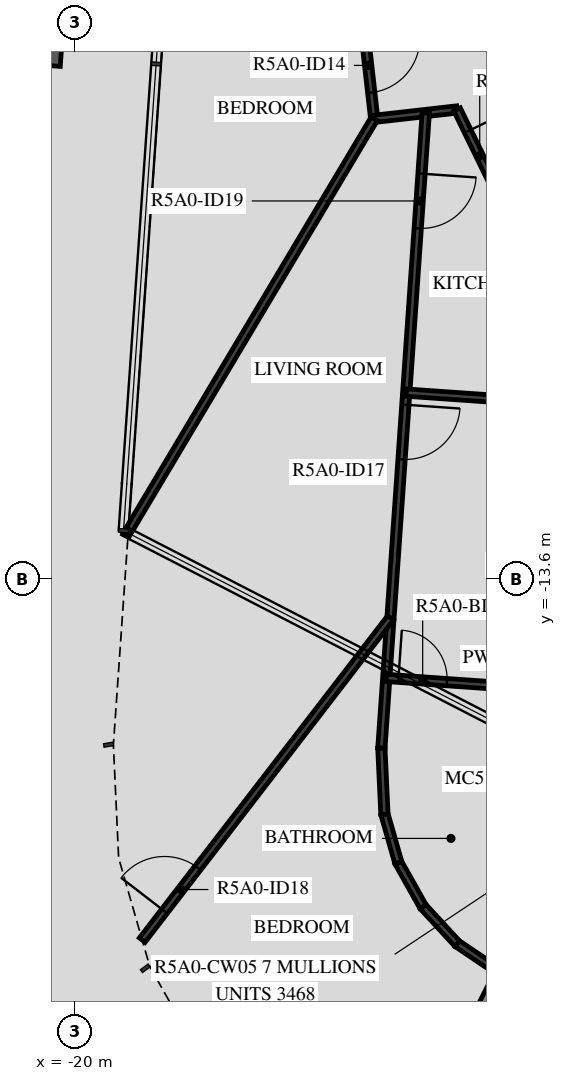
"""IFC4 building model, lengths in metres.
Left out: names, types, materials, properties, quantities, classifications, styles, units other than length and angle.
Written with IfcOpenShell. Run it as: python <this file> out.ifc"""

import sys

from ifc_helpers import new_model, si_unit, direction, frame, frame_2d, origin, origin_2d, place, context, subcontext, project, spatial, rectangle, i_section, extrude, element, fill, save


model = new_model("IFC4")
c1 = context("Model", 3, precision=1e-05, world=origin(), true_north=direction((0.0, 1.0)))
c2 = subcontext(c1, "Body", "Model", "MODEL_VIEW")
j1 = project(units=[si_unit("LENGTHUNIT", "METRE"), si_unit("PLANEANGLEUNIT", "RADIAN")], contexts=[c1])
p1 = place(None, origin())
s1 = spatial("IfcSite", under=j1, at=p1, CompositionType="ELEMENT")
p2 = place(p1, origin())
s2 = spatial("IfcBuilding", under=s1, at=p2, CompositionType="ELEMENT")
p3 = place(p2, frame((0.0, 0.0, 188.4)))
s3 = spatial("IfcBuildingStorey", under=s2, at=p3, CompositionType="ELEMENT", Elevation=188.4)
p4 = place(p3, frame((-20.679, -4.981, -0.45), z_axis=(0.0, 0.0, 1.0), x_axis=(0.069756005795, 0.997564082982, 0.0)))
e1 = element("IfcColumn", 1, at=p4, inside=s3, PredefinedType="COLUMN", context=c2, shape_type="SweptSolid", body=[
    extrude(i_section(OverallWidth=0.3, OverallDepth=0.9, WebThickness=0.019, FlangeThickness=0.035, FilletRadius=0.03, at=origin_2d()), origin(), (0.0, 0.0, 1.0), 3.57),
])
p5 = place(p3, frame((-23.066, -14.25, 0.03), z_axis=(0.0, 0.0, 1.0), x_axis=(0.182236609877, 0.983254706585, 0.0)))
e2 = element("IfcWall", 2, at=p5, inside=s3, PredefinedType="PARAPET", context=c2, shape_type="SweptSolid", body=[
    extrude(rectangle(XDim=36.429, YDim=0.2, at=frame_2d((18.214, 0.0))), origin(), (0.0, 0.0, 1.0), 1.5),
])
p6 = place(p3, frame((-14.979, -24.017, 0.0), z_axis=(0.0, 0.0, 1.0), x_axis=(0.449711952388, 0.893173644864, 0.0)))
e3 = element("IfcWall", 3, at=p6, inside=s3, PredefinedType="STANDARD", context=c2, shape_type="SweptSolid", body=[
    extrude(rectangle(XDim=6.367, YDim=0.2, at=frame_2d((3.184, 0.0))), origin(), (0.0, 0.0, 1.0), 2.73),
])
p7 = place(p3, frame((-15.25, -4.5, 0.0), z_axis=(0.0, 0.0, 1.0), x_axis=(0.1124919794, -0.99365263275, 0.0)))
e4 = element("IfcWall", 4, at=p7, inside=s3, PredefinedType="PARTITIONING", context=c2, shape_type="SweptSolid", body=[
    extrude(rectangle(XDim=1.534, YDim=0.12, at=frame_2d((0.767, 0.0))), origin(), (0.0, 0.0, 1.0), 3.12),
])
p8 = place(p7, frame((0.2, 0.0, 0.0)))
e5 = element("IfcOpeningElement", 5, at=p8, cuts=e4, PredefinedType="OPENING", context=c2, shape_type="SweptSolid", body=[
    extrude(rectangle(XDim=0.9, YDim=2.1, at=frame_2d((0.45, 1.05))), frame((0.0, 0.07, 0.0), z_axis=(0.0, -1.0, 0.0), x_axis=(1.0, 0.0, 0.0)), (0.0, 0.0, 1.0), 0.14),
])
p9 = place(p3, frame((-15.077, -6.025, 0.0), z_axis=(0.0, 0.0, 1.0), x_axis=(0.993646958109, 0.112542092746, 0.0)))
e6 = element("IfcWall", 6, at=p9, inside=s3, PredefinedType="PARTITIONING", context=c2, shape_type="SweptSolid", body=[
    extrude(rectangle(XDim=1.371, YDim=0.12, at=frame_2d((0.686, 0.0))), origin(), (0.0, 0.0, 1.0), 3.12),
])
p10 = place(p3, frame((-13.715, -5.87, 0.0), z_axis=(0.0, 0.0, 1.0), x_axis=(0.438372766482, -0.89879325632, 0.0)))
e7 = element("IfcWall", 7, at=p10, inside=s3, PredefinedType="PARTITIONING", context=c2, shape_type="SweptSolid", body=[
    extrude(rectangle(XDim=4.728, YDim=0.12, at=frame_2d((2.364, 0.0))), origin(), (0.0, 0.0, 1.0), 3.12),
])
p11 = place(p10, frame((0.4, 0.0, 0.0)))
e8 = element("IfcOpeningElement", 8, at=p11, cuts=e7, PredefinedType="OPENING", context=c2, shape_type="SweptSolid", body=[
    extrude(rectangle(XDim=0.9, YDim=2.1, at=frame_2d((0.45, 1.05))), frame((0.0, 0.07, 0.0), z_axis=(0.0, -1.0, 0.0), x_axis=(1.0, 0.0, 0.0)), (0.0, 0.0, 1.0), 0.14),
])
p12 = place(p3, frame((-19.156, -12.863, 0.0), z_axis=(0.0, 0.0, 1.0), x_axis=(0.512316386407, 0.858796786335, 0.0)))
e9 = element("IfcWall", 9, at=p12, inside=s3, PredefinedType="PARTITIONING", context=c2, shape_type="SweptSolid", body=[
    extrude(rectangle(XDim=7.963, YDim=0.12, at=frame_2d((3.981, 0.0))), origin(), (0.0, 0.0, 1.0), 3.12),
])
p13 = place(p3, frame((-14.229, -5.929, 0.0), z_axis=(0.0, 0.0, 1.0), x_axis=(-0.069740723375, -0.997565151508, 0.0)))
e10 = element("IfcWall", 10, at=p13, inside=s3, PredefinedType="PARTITIONING", context=c2, shape_type="SweptSolid", body=[
    extrude(rectangle(XDim=10.47, YDim=0.12, at=frame_2d((5.235, 0.0))), origin(), (0.0, 0.0, 1.0), 3.12),
])
p14 = place(p13, frame((4.809, 0.0, 0.0)))
e11 = element("IfcOpeningElement", 11, at=p14, cuts=e10, PredefinedType="OPENING", context=c2, shape_type="SweptSolid", body=[
    extrude(rectangle(XDim=0.9, YDim=2.1, at=frame_2d((0.45, 1.05))), frame((0.0, 0.07, 0.0), z_axis=(0.0, -1.0, 0.0), x_axis=(1.0, 0.0, 0.0)), (0.0, 0.0, 1.0), 0.14),
])
p15 = place(p13, frame((1.0, 0.0, 0.0)))
e12 = element("IfcOpeningElement", 12, at=p15, cuts=e10, PredefinedType="OPENING", context=c2, shape_type="SweptSolid", body=[
    extrude(rectangle(XDim=0.9, YDim=2.1, at=frame_2d((0.45, 1.05))), frame((0.0, 0.07, 0.0), z_axis=(0.0, -1.0, 0.0), x_axis=(1.0, 0.0, 0.0)), (0.0, 0.0, 1.0), 0.14),
])
p16 = place(p3, frame((-14.551, -10.527, 0.0), z_axis=(0.0, 0.0, 1.0), x_axis=(0.997564247633, -0.069753651118, 0.0)))
e13 = element("IfcWall", 13, at=p16, inside=s3, PredefinedType="PARTITIONING", context=c2, shape_type="SweptSolid", body=[
    extrude(rectangle(XDim=3.927, YDim=0.12, at=frame_2d((1.963, 0.0))), origin(), (0.0, 0.0, 1.0), 3.12),
])
p17 = place(p3, frame((-18.892, -19.531, 0.0), z_axis=(0.0, 0.0, 1.0), x_axis=(0.610326128317, 0.792150249065, 0.0)))
e14 = element("IfcWall", 14, at=p17, inside=s3, PredefinedType="PARTITIONING", context=c2, shape_type="SweptSolid", body=[
    extrude(rectangle(XDim=6.689, YDim=0.12, at=frame_2d((3.345, 0.0))), origin(), (0.0, 0.0, 1.0), 3.12),
])
p18 = place(p17, frame((0.6, 0.0, 0.0)))
e15 = element("IfcOpeningElement", 15, at=p18, cuts=e14, PredefinedType="OPENING", context=c2, shape_type="SweptSolid", body=[
    extrude(rectangle(XDim=0.9, YDim=2.1, at=frame_2d((0.45, 1.05))), frame((0.0, 0.07, 0.0), z_axis=(0.0, -1.0, 0.0), x_axis=(1.0, 0.0, 0.0)), (0.0, 0.0, 1.0), 0.14),
])
p19 = place(p3, frame((-14.879, -15.219, 0.0), z_axis=(0.0, 0.0, 1.0), x_axis=(0.997566012813, -0.069728402248, 0.0)))
e16 = element("IfcWall", 16, at=p19, inside=s3, PredefinedType="PARTITIONING", context=c2, shape_type="SweptSolid", body=[
    extrude(rectangle(XDim=3.039, YDim=0.12, at=frame_2d((1.52, 0.0))), origin(), (0.0, 0.0, 1.0), 3.12),
])
p20 = place(p19, frame((0.2, 0.0, 0.0)))
e17 = element("IfcOpeningElement", 17, at=p20, cuts=e16, PredefinedType="OPENING", context=c2, shape_type="SweptSolid", body=[
    extrude(rectangle(XDim=0.8, YDim=2.1, at=frame_2d((0.4, 1.05))), frame((0.0, 0.07, 0.0), z_axis=(0.0, -1.0, 0.0), x_axis=(1.0, 0.0, 0.0)), (0.0, 0.0, 1.0), 0.14),
])
for number, where, z_axis, x_axis in (
    (18, (-13.025, -20.052, 0.0), (0.0, 0.0, 1.0), (-0.829, 0.559, 0.0)),
    (19, (-13.712, -19.588, 0.0), (0.0, 0.0, 1.0), (-0.678, 0.735, 0.0)),
):
    element("IfcWall", number, at=place(p3, frame(where, z_axis=z_axis, x_axis=x_axis)), inside=s3, PredefinedType="PARTITIONING", context=c2, shape_type="SweptSolid", body=[
        extrude(rectangle(XDim=0.829, YDim=0.12, at=frame_2d((0.415, 0.0))), origin(), (0.0, 0.0, 1.0), 3.12),
    ])
p21 = place(p3, frame((-14.274, -18.979, 0.0), z_axis=(0.0, 0.0, 1.0), x_axis=(-0.490037513137, 0.871701345484, 0.0)))
e20 = element("IfcWall", 20, at=p21, inside=s3, PredefinedType="PARTITIONING", context=c2, shape_type="SweptSolid", body=[
    extrude(rectangle(XDim=0.829, YDim=0.12, at=frame_2d((0.415, 0.0))), origin(), (0.0, 0.0, 1.0), 3.12),
])
p22 = place(p3, frame((-14.68, -18.256, 0.0), z_axis=(0.0, 0.0, 1.0), x_axis=(-0.275382358468, 0.961334778651, 0.0)))
e21 = element("IfcWall", 21, at=p22, inside=s3, PredefinedType="PARTITIONING", context=c2, shape_type="SweptSolid", body=[
    extrude(rectangle(XDim=0.829, YDim=0.12, at=frame_2d((0.415, 0.0))), origin(), (0.0, 0.0, 1.0), 3.12),
])
p23 = place(p3, frame((-14.909, -17.459, 0.0), z_axis=(0.0, 0.0, 1.0), x_axis=(-0.046497887649, 0.99891838828, 0.0)))
e22 = element("IfcWall", 22, at=p23, inside=s3, PredefinedType="PARTITIONING", context=c2, shape_type="SweptSolid", body=[
    extrude(rectangle(XDim=1.087, YDim=0.12, at=frame_2d((0.543, 0.0))), origin(), (0.0, 0.0, 1.0), 3.12),
])
p24 = place(p8, origin())
e23 = element("IfcDoor", 23, at=p24, inside=s3, OperationType="SINGLE_SWING_RIGHT", PredefinedType="DOOR", context=c2, shape_type="SweptSolid", body=[
    extrude(rectangle(XDim=0.9, YDim=2.1, at=frame_2d((0.45, 1.05))), frame((0.0, 0.025, 0.0), z_axis=(0.0, -1.0, 0.0), x_axis=(1.0, 0.0, 0.0)), (0.0, 0.0, 1.0), 0.05),
])
fill(e5, e23)
p25 = place(p11, origin())
e24 = element("IfcDoor", 24, at=p25, inside=s3, OperationType="SINGLE_SWING_RIGHT", PredefinedType="DOOR", context=c2, shape_type="SweptSolid", body=[
    extrude(rectangle(XDim=0.9, YDim=2.1, at=frame_2d((0.45, 1.05))), frame((0.0, 0.025, 0.0), z_axis=(0.0, -1.0, 0.0), x_axis=(1.0, 0.0, 0.0)), (0.0, 0.0, 1.0), 0.05),
])
fill(e8, e24)
p26 = place(p14, origin())
e25 = element("IfcDoor", 25, at=p26, inside=s3, OperationType="SINGLE_SWING_RIGHT", PredefinedType="DOOR", context=c2, shape_type="SweptSolid", body=[
    extrude(rectangle(XDim=0.9, YDim=2.1, at=frame_2d((0.45, 1.05))), frame((0.0, 0.025, 0.0), z_axis=(0.0, -1.0, 0.0), x_axis=(1.0, 0.0, 0.0)), (0.0, 0.0, 1.0), 0.05),
])
fill(e11, e25)
p27 = place(p20, origin())
e26 = element("IfcDoor", 26, at=p27, inside=s3, OperationType="SINGLE_SWING_RIGHT", PredefinedType="DOOR", context=c2, shape_type="SweptSolid", body=[
    extrude(rectangle(XDim=0.8, YDim=2.1, at=frame_2d((0.4, 1.05))), frame((0.0, 0.025, 0.0), z_axis=(0.0, -1.0, 0.0), x_axis=(1.0, 0.0, 0.0)), (0.0, 0.0, 1.0), 0.05),
])
fill(e17, e26)
p28 = place(p18, origin())
e27 = element("IfcDoor", 27, at=p28, inside=s3, OperationType="SINGLE_SWING_RIGHT", PredefinedType="DOOR", context=c2, shape_type="SweptSolid", body=[
    extrude(rectangle(XDim=0.9, YDim=2.1, at=frame_2d((0.45, 1.05))), frame((0.0, 0.025, 0.0), z_axis=(0.0, -1.0, 0.0), x_axis=(1.0, 0.0, 0.0)), (0.0, 0.0, 1.0), 0.05),
])
fill(e15, e27)
p29 = place(p15, origin())
e28 = element("IfcDoor", 28, at=p29, inside=s3, OperationType="SINGLE_SWING_LEFT", PredefinedType="DOOR", context=c2, shape_type="SweptSolid", body=[
    extrude(rectangle(XDim=0.9, YDim=2.1, at=frame_2d((0.45, 1.05))), frame((0.0, 0.025, 0.0), z_axis=(0.0, -1.0, 0.0), x_axis=(1.0, 0.0, 0.0)), (0.0, 0.0, 1.0), 0.05),
])
fill(e12, e28)
save(model, sys.argv[1])
